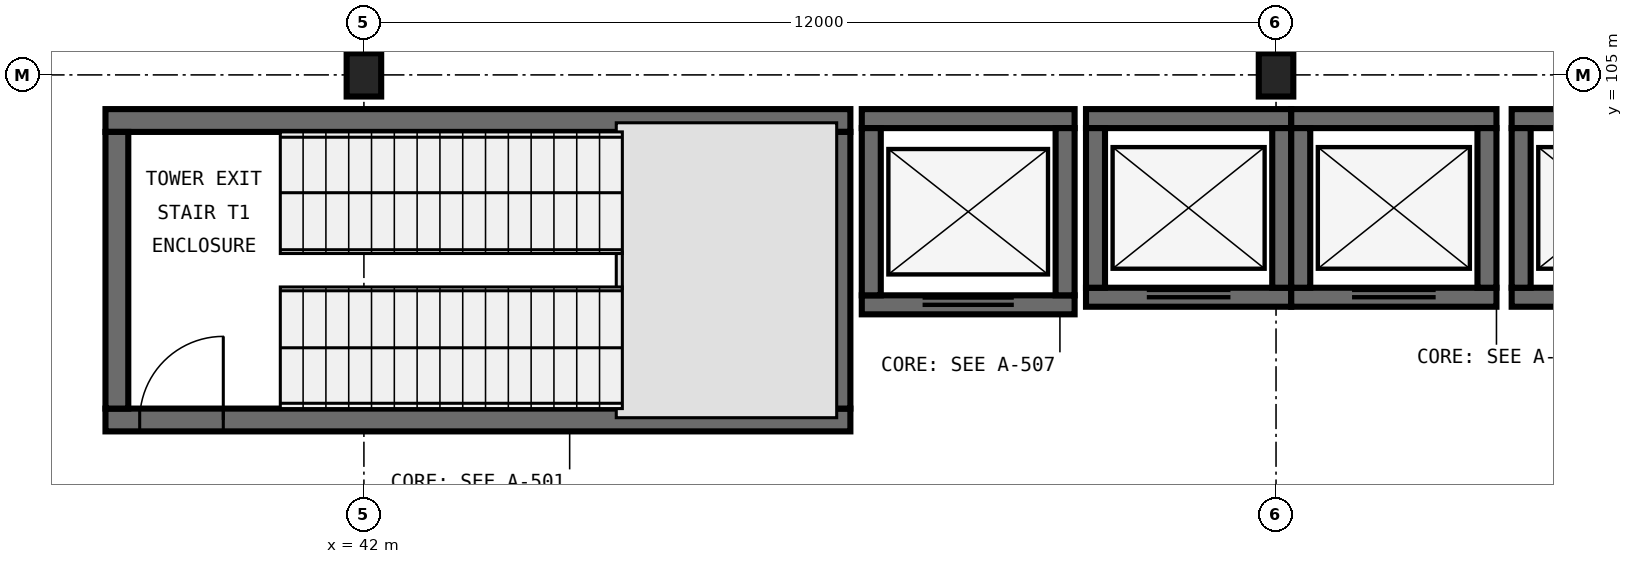
"""IFC4 building model, lengths in metres.
Left out: names, types, materials, properties, quantities, classifications, styles, units other than length and angle.
Written with IfcOpenShell. Run it as: python <this file> out.ifc"""

import sys

from ifc_helpers import new_model, si_unit, direction, frame, frame_2d, origin, origin_2d, place, context, subcontext, project, spatial, rectangle, i_section, extrude, element, fill, save


model = new_model("IFC4")
c1 = context("Model", 3, precision=1e-05, world=origin(), true_north=direction((0.0, 1.0)))
c2 = subcontext(c1, "Body", "Model", "MODEL_VIEW")
j1 = project(units=[si_unit("LENGTHUNIT", "METRE"), si_unit("PLANEANGLEUNIT", "RADIAN")], contexts=[c1])
p1 = place(None, origin())
s1 = spatial("IfcSite", under=j1, at=p1, CompositionType="ELEMENT")
p2 = place(p1, origin())
s2 = spatial("IfcBuilding", under=s1, at=p2, CompositionType="ELEMENT")
p3 = place(p2, frame((0.0, 0.0, -5.4)))
s3 = spatial("IfcBuildingStorey", under=s2, at=p3, CompositionType="ELEMENT", Elevation=-5.4)
for number, where, z_axis, x_axis in (
    (1, (42.0, 105.0, 0.0), (0.0, 0.0, 1.0), (1.0, 0.0, 0.0)),
    (2, (54.0, 105.0, 0.0), (0.0, 0.0, 1.0), (1.0, 0.0, 0.0)),
):
    element("IfcColumn", number, at=place(p3, frame(where, z_axis=z_axis, x_axis=x_axis)), inside=s3, PredefinedType="COLUMN", context=c2, shape_type="SweptSolid", body=[
        extrude(i_section(OverallWidth=0.454, OverallDepth=0.569, WebThickness=0.078, FlangeThickness=0.125, FilletRadius=0.031, at=origin_2d()), origin(), (0.0, 0.0, 1.0), 5.4),
    ])
p4 = place(p3, frame((38.6, 100.46, 0.0), z_axis=(0.0, 0.0, 1.0), x_axis=(1.0, 0.0, 0.0)))
e3 = element("IfcWall", 3, at=p4, inside=s3, PredefinedType="SHEAR", context=c2, shape_type="SweptSolid", body=[
    extrude(rectangle(XDim=9.8, YDim=0.3, at=frame_2d((4.9, 0.0))), origin(), (0.0, 0.0, 1.0), 5.4),
])
p5 = place(p4, frame((0.45, 0.0, 0.0)))
e4 = element("IfcOpeningElement", 4, at=p5, cuts=e3, PredefinedType="OPENING", context=c2, shape_type="SweptSolid", body=[
    extrude(rectangle(XDim=1.1, YDim=2.2, at=frame_2d((0.55, 1.1))), frame((0.0, 0.165, 0.0), z_axis=(0.0, -1.0, 0.0), x_axis=(1.0, 0.0, 0.0)), (0.0, 0.0, 1.0), 0.33),
])
p6 = place(p3, frame((48.4, 104.4, 0.0), z_axis=(0.0, 0.0, 1.0), x_axis=(-1.0, 0.0, 0.0)))
e5 = element("IfcWall", 5, at=p6, inside=s3, PredefinedType="SHEAR", context=c2, shape_type="SweptSolid", body=[
    extrude(rectangle(XDim=9.8, YDim=0.3, at=frame_2d((4.9, 0.0))), origin(), (0.0, 0.0, 1.0), 5.4),
])
for number, where, z_axis, x_axis in (
    (6, (38.75, 104.25, 0.0), (0.0, 0.0, 1.0), (0.0, -1.0, 0.0)),
    (7, (48.25, 100.61, 0.0), (0.0, 0.0, 1.0), (0.0, 1.0, 0.0)),
):
    element("IfcWall", number, at=place(p3, frame(where, z_axis=z_axis, x_axis=x_axis)), inside=s3, PredefinedType="SHEAR", context=c2, shape_type="SweptSolid", body=[
        extrude(rectangle(XDim=3.64, YDim=0.3, at=frame_2d((1.82, 0.0))), origin(), (0.0, 0.0, 1.0), 5.4),
    ])
p7 = place(p3, frame((48.55, 101.975, 0.0), z_axis=(0.0, 0.0, 1.0), x_axis=(1.0, 0.0, 0.0)))
e8 = element("IfcWall", 8, at=p7, inside=s3, PredefinedType="SHEAR", context=c2, shape_type="SweptSolid", body=[
    extrude(rectangle(XDim=2.8, YDim=0.25, at=frame_2d((1.4, 0.0))), origin(), (0.0, 0.0, 1.0), 5.4),
])
p8 = place(p7, frame((0.8, 0.0, 0.0)))
e9 = element("IfcOpeningElement", 9, at=p8, cuts=e8, PredefinedType="OPENING", context=c2, shape_type="SweptSolid", body=[
    extrude(rectangle(XDim=1.2, YDim=2.2, at=frame_2d((0.6, 1.1))), frame((0.0, 0.14, 0.0), z_axis=(0.0, -1.0, 0.0), x_axis=(1.0, 0.0, 0.0)), (0.0, 0.0, 1.0), 0.28),
])
p9 = place(p3, frame((51.35, 104.425, 0.0), z_axis=(0.0, 0.0, 1.0), x_axis=(-1.0, 0.0, 0.0)))
e10 = element("IfcWall", 10, at=p9, inside=s3, PredefinedType="SHEAR", context=c2, shape_type="SweptSolid", body=[
    extrude(rectangle(XDim=2.8, YDim=0.25, at=frame_2d((1.4, 0.0))), origin(), (0.0, 0.0, 1.0), 5.4),
])
for number, where, z_axis, x_axis in (
    (11, (48.675, 104.3, 0.0), (0.0, 0.0, 1.0), (0.0, -1.0, 0.0)),
    (12, (51.225, 102.1, 0.0), (0.0, 0.0, 1.0), (0.0, 1.0, 0.0)),
):
    element("IfcWall", number, at=place(p3, frame(where, z_axis=z_axis, x_axis=x_axis)), inside=s3, PredefinedType="SHEAR", context=c2, shape_type="SweptSolid", body=[
        extrude(rectangle(XDim=2.2, YDim=0.25, at=frame_2d((1.1, 0.0))), origin(), (0.0, 0.0, 1.0), 5.4),
    ])
p10 = place(p3, frame((51.5, 102.075, 0.0), z_axis=(0.0, 0.0, 1.0), x_axis=(1.0, 0.0, 0.0)))
e13 = element("IfcWall", 13, at=p10, inside=s3, PredefinedType="SHEAR", context=c2, shape_type="SweptSolid", body=[
    extrude(rectangle(XDim=2.7, YDim=0.25, at=frame_2d((1.35, 0.0))), origin(), (0.0, 0.0, 1.0), 5.4),
])
p11 = place(p10, frame((0.8, 0.0, 0.0)))
e14 = element("IfcOpeningElement", 14, at=p11, cuts=e13, PredefinedType="OPENING", context=c2, shape_type="SweptSolid", body=[
    extrude(rectangle(XDim=1.1, YDim=2.2, at=frame_2d((0.55, 1.1))), frame((0.0, 0.14, 0.0), z_axis=(0.0, -1.0, 0.0), x_axis=(1.0, 0.0, 0.0)), (0.0, 0.0, 1.0), 0.28),
])
p12 = place(p3, frame((54.2, 104.425, 0.0), z_axis=(0.0, 0.0, 1.0), x_axis=(-1.0, 0.0, 0.0)))
e15 = element("IfcWall", 15, at=p12, inside=s3, PredefinedType="SHEAR", context=c2, shape_type="SweptSolid", body=[
    extrude(rectangle(XDim=2.7, YDim=0.25, at=frame_2d((1.35, 0.0))), origin(), (0.0, 0.0, 1.0), 5.4),
])
for number, where, z_axis, x_axis in (
    (16, (51.625, 104.3, 0.0), (0.0, 0.0, 1.0), (0.0, -1.0, 0.0)),
    (17, (54.075, 102.2, 0.0), (0.0, 0.0, 1.0), (0.0, 1.0, 0.0)),
):
    element("IfcWall", number, at=place(p3, frame(where, z_axis=z_axis, x_axis=x_axis)), inside=s3, PredefinedType="SHEAR", context=c2, shape_type="SweptSolid", body=[
        extrude(rectangle(XDim=2.1, YDim=0.25, at=frame_2d((1.05, 0.0))), origin(), (0.0, 0.0, 1.0), 5.4),
    ])
p13 = place(p3, frame((54.2, 102.075, 0.0), z_axis=(0.0, 0.0, 1.0), x_axis=(1.0, 0.0, 0.0)))
e18 = element("IfcWall", 18, at=p13, inside=s3, PredefinedType="SHEAR", context=c2, shape_type="SweptSolid", body=[
    extrude(rectangle(XDim=2.7, YDim=0.25, at=frame_2d((1.35, 0.0))), origin(), (0.0, 0.0, 1.0), 5.4),
])
p14 = place(p13, frame((0.8, 0.0, 0.0)))
e19 = element("IfcOpeningElement", 19, at=p14, cuts=e18, PredefinedType="OPENING", context=c2, shape_type="SweptSolid", body=[
    extrude(rectangle(XDim=1.1, YDim=2.2, at=frame_2d((0.55, 1.1))), frame((0.0, 0.14, 0.0), z_axis=(0.0, -1.0, 0.0), x_axis=(1.0, 0.0, 0.0)), (0.0, 0.0, 1.0), 0.28),
])
p15 = place(p3, frame((56.9, 104.425, 0.0), z_axis=(0.0, 0.0, 1.0), x_axis=(-1.0, 0.0, 0.0)))
e20 = element("IfcWall", 20, at=p15, inside=s3, PredefinedType="SHEAR", context=c2, shape_type="SweptSolid", body=[
    extrude(rectangle(XDim=2.7, YDim=0.25, at=frame_2d((1.35, 0.0))), origin(), (0.0, 0.0, 1.0), 5.4),
])
for number, where, z_axis, x_axis in (
    (21, (54.325, 104.3, 0.0), (0.0, 0.0, 1.0), (0.0, -1.0, 0.0)),
    (22, (56.775, 102.2, 0.0), (0.0, 0.0, 1.0), (0.0, 1.0, 0.0)),
):
    element("IfcWall", number, at=place(p3, frame(where, z_axis=z_axis, x_axis=x_axis)), inside=s3, PredefinedType="SHEAR", context=c2, shape_type="SweptSolid", body=[
        extrude(rectangle(XDim=2.1, YDim=0.25, at=frame_2d((1.05, 0.0))), origin(), (0.0, 0.0, 1.0), 5.4),
    ])
p16 = place(p3, frame((57.1, 102.075, 0.0), z_axis=(0.0, 0.0, 1.0), x_axis=(1.0, 0.0, 0.0)))
e23 = element("IfcWall", 23, at=p16, inside=s3, PredefinedType="SHEAR", context=c2, shape_type="SweptSolid", body=[
    extrude(rectangle(XDim=2.7, YDim=0.25, at=frame_2d((1.35, 0.0))), origin(), (0.0, 0.0, 1.0), 5.4),
])
p17 = place(p16, frame((0.8, 0.0, 0.0)))
e24 = element("IfcOpeningElement", 24, at=p17, cuts=e23, PredefinedType="OPENING", context=c2, shape_type="SweptSolid", body=[
    extrude(rectangle(XDim=1.1, YDim=2.2, at=frame_2d((0.55, 1.1))), frame((0.0, 0.14, 0.0), z_axis=(0.0, -1.0, 0.0), x_axis=(1.0, 0.0, 0.0)), (0.0, 0.0, 1.0), 0.28),
])
p18 = place(p3, frame((59.8, 104.425, 0.0), z_axis=(0.0, 0.0, 1.0), x_axis=(-1.0, 0.0, 0.0)))
e25 = element("IfcWall", 25, at=p18, inside=s3, PredefinedType="SHEAR", context=c2, shape_type="SweptSolid", body=[
    extrude(rectangle(XDim=2.7, YDim=0.25, at=frame_2d((1.35, 0.0))), origin(), (0.0, 0.0, 1.0), 5.4),
])
p19 = place(p3, frame((57.225, 104.3, 0.0), z_axis=(0.0, 0.0, 1.0), x_axis=(0.0, -1.0, 0.0)))
e26 = element("IfcWall", 26, at=p19, inside=s3, PredefinedType="SHEAR", context=c2, shape_type="SweptSolid", body=[
    extrude(rectangle(XDim=2.1, YDim=0.25, at=frame_2d((1.05, 0.0))), origin(), (0.0, 0.0, 1.0), 5.4),
])
p20 = place(p5, origin())
e27 = element("IfcDoor", 27, at=p20, inside=s3, OperationType="SINGLE_SWING_RIGHT", PredefinedType="DOOR", context=c2, shape_type="SweptSolid", body=[
    extrude(rectangle(XDim=1.1, YDim=2.2, at=frame_2d((0.55, 1.1))), frame((0.0, 0.025, 0.0), z_axis=(0.0, -1.0, 0.0), x_axis=(1.0, 0.0, 0.0)), (0.0, 0.0, 1.0), 0.05),
])
fill(e4, e27)
p21 = place(p8, origin())
e28 = element("IfcDoor", 28, at=p21, inside=s3, OperationType="DOUBLE_DOOR_SLIDING", PredefinedType="DOOR", context=c2, shape_type="SweptSolid", body=[
    extrude(rectangle(XDim=1.2, YDim=2.2, at=frame_2d((0.6, 1.1))), frame((0.0, 0.025, 0.0), z_axis=(0.0, -1.0, 0.0), x_axis=(1.0, 0.0, 0.0)), (0.0, 0.0, 1.0), 0.05),
])
fill(e9, e28)
p22 = place(p11, origin())
e29 = element("IfcDoor", 29, at=p22, inside=s3, OperationType="DOUBLE_DOOR_SLIDING", PredefinedType="DOOR", context=c2, shape_type="SweptSolid", body=[
    extrude(rectangle(XDim=1.1, YDim=2.2, at=frame_2d((0.55, 1.1))), frame((0.0, 0.025, 0.0), z_axis=(0.0, -1.0, 0.0), x_axis=(1.0, 0.0, 0.0)), (0.0, 0.0, 1.0), 0.05),
])
fill(e14, e29)
p23 = place(p14, origin())
e30 = element("IfcDoor", 30, at=p23, inside=s3, OperationType="DOUBLE_DOOR_SLIDING", PredefinedType="DOOR", context=c2, shape_type="SweptSolid", body=[
    extrude(rectangle(XDim=1.1, YDim=2.2, at=frame_2d((0.55, 1.1))), frame((0.0, 0.025, 0.0), z_axis=(0.0, -1.0, 0.0), x_axis=(1.0, 0.0, 0.0)), (0.0, 0.0, 1.0), 0.05),
])
fill(e19, e30)
save(model, sys.argv[1])
